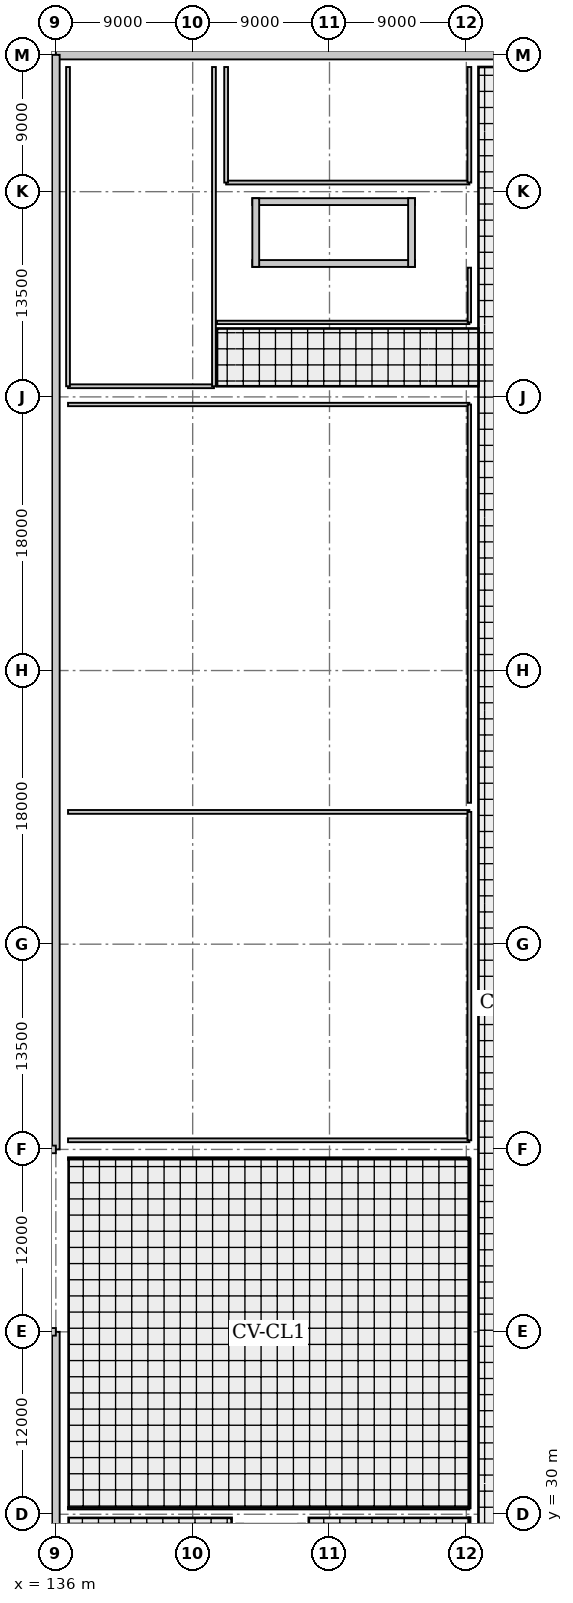
"""IFC4 building model, lengths in metres.
Left out: names, types, materials, properties, quantities, classifications, styles, units other than length and angle.
Written with IfcOpenShell. Run it as: python <this file> out.ifc"""

import sys

from ifc_helpers import new_model, si_unit, direction, frame, frame_2d, origin, origin_2d, place, context, subcontext, project, spatial, rectangle, extrude, element, fill, save


model = new_model("IFC4")
c1 = context("Model", 3, precision=1e-05, world=origin(), true_north=direction((0.0, 1.0)))
c2 = subcontext(c1, "Body", "Model", "MODEL_VIEW")
j1 = project(units=[si_unit("LENGTHUNIT", "METRE"), si_unit("PLANEANGLEUNIT", "RADIAN")], contexts=[c1])
p1 = place(None, origin())
s1 = spatial("IfcSite", under=j1, at=p1, CompositionType="ELEMENT")
p2 = place(p1, origin())
s2 = spatial("IfcBuilding", under=s1, at=p2, CompositionType="ELEMENT")
p3 = place(p2, frame((0.0, 0.0, -5.4)))
s3 = spatial("IfcBuildingStorey", under=s2, at=p3, CompositionType="ELEMENT", Elevation=-5.4)
for number, where, z_axis, x_axis in (
    (1, (136.0, 30.0, 0.0), (0.0, 0.0, 1.0), (1.0, 0.0, 0.0)),
    (2, (136.0, 42.0, 0.0), (0.0, 0.0, 1.0), (1.0, 0.0, 0.0)),
    (3, (136.0, 54.0, 0.0), (0.0, 0.0, 1.0), (1.0, 0.0, 0.0)),
):
    element("IfcColumn", number, at=place(p3, frame(where, z_axis=z_axis, x_axis=x_axis)), inside=s3, PredefinedType="COLUMN", context=c2, shape_type="SweptSolid", body=[
        extrude(rectangle(XDim=0.85, YDim=0.85, at=origin_2d()), origin(), (0.0, 0.0, 1.0), 5.4),
    ])
for number, where, z_axis, x_axis in (
    (4, (136.0, 67.5, 0.0), (0.0, 0.0, 1.0), (1.0, 0.0, 0.0)),
    (5, (136.0, 76.5, 0.0), (0.0, 0.0, 1.0), (1.0, 0.0, 0.0)),
    (6, (136.0, 85.5, 0.0), (0.0, 0.0, 1.0), (1.0, 0.0, 0.0)),
    (7, (136.0, 94.5, 0.0), (0.0, 0.0, 1.0), (1.0, 0.0, 0.0)),
    (8, (136.0, 103.5, 0.0), (0.0, 0.0, 1.0), (1.0, 0.0, 0.0)),
    (9, (136.0, 117.0, 0.0), (0.0, 0.0, 1.0), (1.0, 0.0, 0.0)),
    (10, (136.0, 126.0, 0.0), (0.0, 0.0, 1.0), (1.0, 0.0, 0.0)),
):
    element("IfcColumn", number, at=place(p3, frame(where, z_axis=z_axis, x_axis=x_axis)), inside=s3, PredefinedType="COLUMN", context=c2, shape_type="SweptSolid", body=[
        extrude(rectangle(XDim=1.0, YDim=0.9, at=origin_2d()), origin(), (0.0, 0.0, 1.0), 5.4),
    ])
for number, where, z_axis, x_axis in (
    (11, (145.0, 30.0, 0.0), (0.0, 0.0, 1.0), (1.0, 0.0, 0.0)),
    (12, (145.0, 42.0, 0.0), (0.0, 0.0, 1.0), (1.0, 0.0, 0.0)),
    (13, (145.0, 54.0, 0.0), (0.0, 0.0, 1.0), (1.0, 0.0, 0.0)),
):
    element("IfcColumn", number, at=place(p3, frame(where, z_axis=z_axis, x_axis=x_axis)), inside=s3, PredefinedType="COLUMN", context=c2, shape_type="SweptSolid", body=[
        extrude(rectangle(XDim=0.85, YDim=0.85, at=origin_2d()), origin(), (0.0, 0.0, 1.0), 5.4),
    ])
for number, where, z_axis, x_axis in (
    (14, (145.0, 67.5, 0.0), (0.0, 0.0, 1.0), (1.0, 0.0, 0.0)),
    (15, (145.0, 76.5, 0.0), (0.0, 0.0, 1.0), (1.0, 0.0, 0.0)),
    (16, (145.0, 85.5, 0.0), (0.0, 0.0, 1.0), (1.0, 0.0, 0.0)),
    (17, (145.0, 94.5, 0.0), (0.0, 0.0, 1.0), (1.0, 0.0, 0.0)),
    (18, (145.0, 103.5, 0.0), (0.0, 0.0, 1.0), (1.0, 0.0, 0.0)),
    (19, (145.0, 117.0, 0.0), (0.0, 0.0, 1.0), (1.0, 0.0, 0.0)),
    (20, (145.0, 126.0, 0.0), (0.0, 0.0, 1.0), (1.0, 0.0, 0.0)),
):
    element("IfcColumn", number, at=place(p3, frame(where, z_axis=z_axis, x_axis=x_axis)), inside=s3, PredefinedType="COLUMN", context=c2, shape_type="SweptSolid", body=[
        extrude(rectangle(XDim=1.0, YDim=0.9, at=origin_2d()), origin(), (0.0, 0.0, 1.0), 5.4),
    ])
for number, where, z_axis, x_axis in (
    (21, (154.0, 30.0, 0.0), (0.0, 0.0, 1.0), (1.0, 0.0, 0.0)),
    (22, (154.0, 42.0, 0.0), (0.0, 0.0, 1.0), (1.0, 0.0, 0.0)),
    (23, (154.0, 54.0, 0.0), (0.0, 0.0, 1.0), (1.0, 0.0, 0.0)),
):
    element("IfcColumn", number, at=place(p3, frame(where, z_axis=z_axis, x_axis=x_axis)), inside=s3, PredefinedType="COLUMN", context=c2, shape_type="SweptSolid", body=[
        extrude(rectangle(XDim=0.85, YDim=0.85, at=origin_2d()), origin(), (0.0, 0.0, 1.0), 5.4),
    ])
for number, where, z_axis, x_axis in (
    (24, (154.0, 67.5, 0.0), (0.0, 0.0, 1.0), (1.0, 0.0, 0.0)),
    (25, (154.0, 76.5, 0.0), (0.0, 0.0, 1.0), (1.0, 0.0, 0.0)),
    (26, (154.0, 85.5, 0.0), (0.0, 0.0, 1.0), (1.0, 0.0, 0.0)),
    (27, (154.0, 94.5, 0.0), (0.0, 0.0, 1.0), (1.0, 0.0, 0.0)),
    (28, (154.0, 103.5, 0.0), (0.0, 0.0, 1.0), (1.0, 0.0, 0.0)),
    (29, (154.0, 117.0, 0.0), (0.0, 0.0, 1.0), (1.0, 0.0, 0.0)),
    (30, (154.0, 126.0, 0.0), (0.0, 0.0, 1.0), (1.0, 0.0, 0.0)),
):
    element("IfcColumn", number, at=place(p3, frame(where, z_axis=z_axis, x_axis=x_axis)), inside=s3, PredefinedType="COLUMN", context=c2, shape_type="SweptSolid", body=[
        extrude(rectangle(XDim=1.0, YDim=0.9, at=origin_2d()), origin(), (0.0, 0.0, 1.0), 5.4),
    ])
for number, where, z_axis, x_axis in (
    (31, (163.0, 30.0, 0.0), (0.0, 0.0, 1.0), (1.0, 0.0, 0.0)),
    (32, (163.0, 42.0, 0.0), (0.0, 0.0, 1.0), (1.0, 0.0, 0.0)),
    (33, (163.0, 54.0, 0.0), (0.0, 0.0, 1.0), (1.0, 0.0, 0.0)),
):
    element("IfcColumn", number, at=place(p3, frame(where, z_axis=z_axis, x_axis=x_axis)), inside=s3, PredefinedType="COLUMN", context=c2, shape_type="SweptSolid", body=[
        extrude(rectangle(XDim=0.85, YDim=0.85, at=origin_2d()), origin(), (0.0, 0.0, 1.0), 5.4),
    ])
for number, where, z_axis, x_axis in (
    (34, (163.0, 67.5, 0.0), (0.0, 0.0, 1.0), (1.0, 0.0, 0.0)),
    (35, (163.0, 76.5, 0.0), (0.0, 0.0, 1.0), (1.0, 0.0, 0.0)),
    (36, (163.0, 85.5, 0.0), (0.0, 0.0, 1.0), (1.0, 0.0, 0.0)),
    (37, (163.0, 94.5, 0.0), (0.0, 0.0, 1.0), (1.0, 0.0, 0.0)),
    (38, (163.0, 103.5, 0.0), (0.0, 0.0, 1.0), (1.0, 0.0, 0.0)),
    (39, (163.0, 117.0, 0.0), (0.0, 0.0, 1.0), (1.0, 0.0, 0.0)),
    (40, (163.0, 126.0, 0.0), (0.0, 0.0, 1.0), (1.0, 0.0, 0.0)),
):
    element("IfcColumn", number, at=place(p3, frame(where, z_axis=z_axis, x_axis=x_axis)), inside=s3, PredefinedType="COLUMN", context=c2, shape_type="SweptSolid", body=[
        extrude(rectangle(XDim=1.0, YDim=0.9, at=origin_2d()), origin(), (0.0, 0.0, 1.0), 5.4),
    ])
p4 = place(p3, frame((188.0, 126.0, 0.0), z_axis=(0.0, 0.0, 1.0), x_axis=(-1.0, 0.0, 0.0)))
e41 = element("IfcWall", 41, at=p4, inside=s3, PredefinedType="USERDEFINED", context=c2, shape_type="SweptSolid", body=[
    extrude(rectangle(XDim=52.0, YDim=0.6, at=frame_2d((26.0, 0.0))), origin(), (0.0, 0.0, 1.0), 5.1),
])
p5 = place(p3, frame((136.0, 126.0, 0.0), z_axis=(0.0, 0.0, 1.0), x_axis=(0.0, -1.0, 0.0)))
e42 = element("IfcWall", 42, at=p5, inside=s3, PredefinedType="USERDEFINED", context=c2, shape_type="SweptSolid", body=[
    extrude(rectangle(XDim=72.0, YDim=0.5, at=frame_2d((36.0, 0.0))), origin(), (0.0, 0.0, 1.0), 5.1),
])
p6 = place(p3, frame((136.0, 42.0, 0.0), z_axis=(0.0, 0.0, 1.0), x_axis=(0.0, -1.0, 0.0)))
e43 = element("IfcWall", 43, at=p6, inside=s3, PredefinedType="USERDEFINED", context=c2, shape_type="SweptSolid", body=[
    extrude(rectangle(XDim=42.0, YDim=0.5, at=frame_2d((21.0, 0.0))), origin(), (0.0, 0.0, 1.0), 5.1),
])
for number, where, z_axis, x_axis in (
    (44, (90.0, 54.0, 0.0), (0.0, 0.0, 1.0), (1.0, 0.0, 0.0)),
    (45, (136.0, 42.0, 0.0), (0.0, 0.0, 1.0), (-1.0, 0.0, 0.0)),
):
    element("IfcWall", number, at=place(p3, frame(where, z_axis=z_axis, x_axis=x_axis)), inside=s3, PredefinedType="USERDEFINED", context=c2, shape_type="SweptSolid", body=[
        extrude(rectangle(XDim=46.0, YDim=0.5, at=frame_2d((23.0, 0.0))), origin(), (0.0, 0.0, 1.0), 5.05),
    ])
p7 = place(p3, frame((148.925, 112.275, 0.0), z_axis=(0.0, 0.0, 1.0), x_axis=(1.0, 0.0, 0.0)))
e46 = element("IfcWall", 46, at=p7, inside=s3, PredefinedType="SHEAR", context=c2, shape_type="SweptSolid", body=[
    extrude(rectangle(XDim=10.698, YDim=0.45, at=frame_2d((5.349, 0.0))), origin(), (0.0, 0.0, 1.0), 5.1),
])
p8 = place(p7, frame((0.55, 0.0, 0.0)))
e47 = element("IfcOpeningElement", 47, at=p8, cuts=e46, PredefinedType="OPENING", context=c2, shape_type="SweptSolid", body=[
    extrude(rectangle(XDim=1.3, YDim=2.1, at=frame_2d((0.65, 1.05))), frame((0.0, 0.235, 0.0), z_axis=(0.0, -1.0, 0.0), x_axis=(1.0, 0.0, 0.0)), (0.0, 0.0, 1.0), 0.47),
])
p9 = place(p3, frame((159.623, 116.345, 0.0), z_axis=(0.0, 0.0, 1.0), x_axis=(-1.0, 0.0, 0.0)))
e48 = element("IfcWall", 48, at=p9, inside=s3, PredefinedType="SHEAR", context=c2, shape_type="SweptSolid", body=[
    extrude(rectangle(XDim=10.698, YDim=0.45, at=frame_2d((5.349, 0.0))), origin(), (0.0, 0.0, 1.0), 5.1),
])
for number, where, z_axis, x_axis in (
    (49, (159.397, 112.05, 0.0), (0.0, 0.0, 1.0), (0.0, 1.0, 0.0)),
    (50, (149.15, 116.57, 0.0), (0.0, 0.0, 1.0), (0.0, -1.0, 0.0)),
):
    element("IfcWall", number, at=place(p3, frame(where, z_axis=z_axis, x_axis=x_axis)), inside=s3, PredefinedType="SHEAR", context=c2, shape_type="SweptSolid", body=[
        extrude(rectangle(XDim=4.52, YDim=0.45, at=frame_2d((2.26, 0.0))), origin(), (0.0, 0.0, 1.0), 5.1),
    ])
for number, where, z_axis, x_axis in (
    (51, (163.2, 30.4, 0.0), (0.0, 0.0, 1.0), (-1.0, 0.0, 0.0)),
    (52, (136.8, 53.4, 0.0), (0.0, 0.0, 1.0), (1.0, 0.0, 0.0)),
):
    element("IfcWall", number, at=place(p3, frame(where, z_axis=z_axis, x_axis=x_axis)), inside=s3, PredefinedType="PARTITIONING", context=c2, shape_type="SweptSolid", body=[
        extrude(rectangle(XDim=26.4, YDim=0.16, at=frame_2d((13.2, 0.0))), origin(), (0.0, 0.0, 1.0), 4.4),
    ])
p10 = place(p3, frame((163.2, 53.4, 0.0), z_axis=(0.0, 0.0, 1.0), x_axis=(0.0, -1.0, 0.0)))
e53 = element("IfcWall", 53, at=p10, inside=s3, PredefinedType="PARTITIONING", context=c2, shape_type="SweptSolid", body=[
    extrude(rectangle(XDim=23.0, YDim=0.16, at=frame_2d((11.5, 0.0))), origin(), (0.0, 0.0, 1.0), 4.4),
])
p11 = place(p10, frame((12.9, 0.0, 0.0)))
e54 = element("IfcOpeningElement", 54, at=p11, cuts=e53, PredefinedType="OPENING", context=c2, shape_type="SweptSolid", body=[
    extrude(rectangle(XDim=1.8, YDim=2.2, at=frame_2d((0.9, 1.1))), frame((0.0, 0.09, 0.0), z_axis=(0.0, -1.0, 0.0), x_axis=(1.0, 0.0, 0.0)), (0.0, 0.0, 1.0), 0.18),
])
p12 = place(p10, frame((17.48, 0.0, 0.0)))
e55 = element("IfcOpeningElement", 55, at=p12, cuts=e53, PredefinedType="OPENING", context=c2, shape_type="SweptSolid", body=[
    extrude(rectangle(XDim=1.8, YDim=2.2, at=frame_2d((0.9, 1.1))), frame((0.0, 0.09, 0.0), z_axis=(0.0, -1.0, 0.0), x_axis=(1.0, 0.0, 0.0)), (0.0, 0.0, 1.0), 0.18),
])
p13 = place(p3, frame((163.2, 29.8, 0.0), z_axis=(0.0, 0.0, 1.0), x_axis=(0.0, -1.0, 0.0)))
e56 = element("IfcWall", 56, at=p13, inside=s3, PredefinedType="PARTITIONING", context=c2, shape_type="SweptSolid", body=[
    extrude(rectangle(XDim=13.0, YDim=0.15, at=frame_2d((6.5, 0.0))), origin(), (0.0, 0.0, 1.0), 4.4),
])
p14 = place(p13, frame((5.75, 0.0, 0.0)))
e57 = element("IfcOpeningElement", 57, at=p14, cuts=e56, PredefinedType="OPENING", context=c2, shape_type="SweptSolid", body=[
    extrude(rectangle(XDim=1.5, YDim=2.15, at=frame_2d((0.75, 1.075))), frame((0.0, 0.085, 0.0), z_axis=(0.0, -1.0, 0.0), x_axis=(1.0, 0.0, 0.0)), (0.0, 0.0, 1.0), 0.17),
])
for number, where, z_axis, x_axis in (
    (58, (163.2, 54.6, 0.0), (0.0, 0.0, 1.0), (-1.0, 0.0, 0.0)),
    (59, (136.8, 76.2, 0.0), (0.0, 0.0, 1.0), (1.0, 0.0, 0.0)),
):
    element("IfcWall", number, at=place(p3, frame(where, z_axis=z_axis, x_axis=x_axis)), inside=s3, PredefinedType="SOLIDWALL", context=c2, shape_type="SweptSolid", body=[
        extrude(rectangle(XDim=26.4, YDim=0.25, at=frame_2d((13.2, 0.0))), origin(), (0.0, 0.0, 1.0), 4.4),
    ])
p15 = place(p3, frame((163.2, 76.2, 0.0), z_axis=(0.0, 0.0, 1.0), x_axis=(0.0, -1.0, 0.0)))
e60 = element("IfcWall", 60, at=p15, inside=s3, PredefinedType="SOLIDWALL", context=c2, shape_type="SweptSolid", body=[
    extrude(rectangle(XDim=21.6, YDim=0.25, at=frame_2d((10.8, 0.0))), origin(), (0.0, 0.0, 1.0), 4.4),
])
p16 = place(p15, frame((9.9, 0.0, 0.0)))
e61 = element("IfcOpeningElement", 61, at=p16, cuts=e60, PredefinedType="OPENING", context=c2, shape_type="SweptSolid", body=[
    extrude(rectangle(XDim=1.8, YDim=2.2, at=frame_2d((0.9, 1.1))), frame((0.0, 0.135, 0.0), z_axis=(0.0, -1.0, 0.0), x_axis=(1.0, 0.0, 0.0)), (0.0, 0.0, 1.0), 0.27),
])
p17 = place(p3, frame((136.8, 103.0, 0.0), z_axis=(0.0, 0.0, 1.0), x_axis=(1.0, 0.0, 0.0)))
e62 = element("IfcWall", 62, at=p17, inside=s3, PredefinedType="SOLIDWALL", context=c2, shape_type="SweptSolid", body=[
    extrude(rectangle(XDim=26.4, YDim=0.22, at=frame_2d((13.2, 0.0))), origin(), (0.0, 0.0, 1.0), 4.4),
])
p18 = place(p3, frame((163.2, 103.0, 0.0), z_axis=(0.0, 0.0, 1.0), x_axis=(0.0, -1.0, 0.0)))
e63 = element("IfcWall", 63, at=p18, inside=s3, PredefinedType="SOLIDWALL", context=c2, shape_type="SweptSolid", body=[
    extrude(rectangle(XDim=26.2, YDim=0.22, at=frame_2d((13.1, 0.0))), origin(), (0.0, 0.0, 1.0), 4.4),
])
p19 = place(p18, frame((12.2, 0.0, 0.0)))
e64 = element("IfcOpeningElement", 64, at=p19, cuts=e63, PredefinedType="OPENING", context=c2, shape_type="SweptSolid", body=[
    extrude(rectangle(XDim=1.8, YDim=2.2, at=frame_2d((0.9, 1.1))), frame((0.0, 0.12, 0.0), z_axis=(0.0, -1.0, 0.0), x_axis=(1.0, 0.0, 0.0)), (0.0, 0.0, 1.0), 0.24),
])
p20 = place(p3, frame((146.4, 104.2, 0.0), z_axis=(0.0, 0.0, 1.0), x_axis=(-1.0, 0.0, 0.0)))
e65 = element("IfcWall", 65, at=p20, inside=s3, PredefinedType="SOLIDWALL", context=c2, shape_type="SweptSolid", body=[
    extrude(rectangle(XDim=9.6, YDim=0.25, at=frame_2d((4.8, 0.0))), origin(), (0.0, 0.0, 1.0), 4.4),
])
p21 = place(p3, frame((136.8, 104.2, 0.0), z_axis=(0.0, 0.0, 1.0), x_axis=(0.0, 1.0, 0.0)))
e66 = element("IfcWall", 66, at=p21, inside=s3, PredefinedType="SOLIDWALL", context=c2, shape_type="SweptSolid", body=[
    extrude(rectangle(XDim=21.0, YDim=0.25, at=frame_2d((10.5, 0.0))), origin(), (0.0, 0.0, 1.0), 4.4),
])
p22 = place(p3, frame((146.4, 125.2, 0.0), z_axis=(0.0, 0.0, 1.0), x_axis=(0.0, -1.0, 0.0)))
e67 = element("IfcWall", 67, at=p22, inside=s3, PredefinedType="SOLIDWALL", context=c2, shape_type="SweptSolid", body=[
    extrude(rectangle(XDim=21.0, YDim=0.25, at=frame_2d((10.5, 0.0))), origin(), (0.0, 0.0, 1.0), 4.4),
])
p23 = place(p22, frame((9.75, 0.0, 0.0)))
e68 = element("IfcOpeningElement", 68, at=p23, cuts=e67, PredefinedType="OPENING", context=c2, shape_type="SweptSolid", body=[
    extrude(rectangle(XDim=1.5, YDim=2.15, at=frame_2d((0.75, 1.075))), frame((0.0, 0.135, 0.0), z_axis=(0.0, -1.0, 0.0), x_axis=(1.0, 0.0, 0.0)), (0.0, 0.0, 1.0), 0.27),
])
p24 = place(p3, frame((163.2, 108.4, 0.0), z_axis=(0.0, 0.0, 1.0), x_axis=(-1.0, 0.0, 0.0)))
e69 = element("IfcWall", 69, at=p24, inside=s3, PredefinedType="SOLIDWALL", context=c2, shape_type="SweptSolid", body=[
    extrude(rectangle(XDim=16.6, YDim=0.22, at=frame_2d((8.3, 0.0))), origin(), (0.0, 0.0, 1.0), 4.4),
])
p25 = place(p24, frame((7.65, 0.0, 0.0)))
e70 = element("IfcOpeningElement", 70, at=p25, cuts=e69, PredefinedType="OPENING", context=c2, shape_type="SweptSolid", body=[
    extrude(rectangle(XDim=1.3, YDim=2.1, at=frame_2d((0.65, 1.05))), frame((0.0, 0.12, 0.0), z_axis=(0.0, -1.0, 0.0), x_axis=(1.0, 0.0, 0.0)), (0.0, 0.0, 1.0), 0.24),
])
p26 = place(p3, frame((163.2, 112.0, 0.0), z_axis=(0.0, 0.0, 1.0), x_axis=(0.0, -1.0, 0.0)))
e71 = element("IfcWall", 71, at=p26, inside=s3, PredefinedType="SOLIDWALL", context=c2, shape_type="SweptSolid", body=[
    extrude(rectangle(XDim=3.6, YDim=0.22, at=frame_2d((1.8, 0.0))), origin(), (0.0, 0.0, 1.0), 4.4),
])
p27 = place(p3, frame((163.2, 117.6, 0.0), z_axis=(0.0, 0.0, 1.0), x_axis=(-1.0, 0.0, 0.0)))
e72 = element("IfcWall", 72, at=p27, inside=s3, PredefinedType="SOLIDWALL", context=c2, shape_type="SweptSolid", body=[
    extrude(rectangle(XDim=16.0, YDim=0.25, at=frame_2d((8.0, 0.0))), origin(), (0.0, 0.0, 1.0), 4.4),
])
p28 = place(p3, frame((147.2, 117.6, 0.0), z_axis=(0.0, 0.0, 1.0), x_axis=(0.0, 1.0, 0.0)))
e73 = element("IfcWall", 73, at=p28, inside=s3, PredefinedType="SOLIDWALL", context=c2, shape_type="SweptSolid", body=[
    extrude(rectangle(XDim=7.6, YDim=0.25, at=frame_2d((3.8, 0.0))), origin(), (0.0, 0.0, 1.0), 4.4),
])
p29 = place(p3, frame((163.2, 125.2, 0.0), z_axis=(0.0, 0.0, 1.0), x_axis=(0.0, -1.0, 0.0)))
e74 = element("IfcWall", 74, at=p29, inside=s3, PredefinedType="SOLIDWALL", context=c2, shape_type="SweptSolid", body=[
    extrude(rectangle(XDim=7.6, YDim=0.25, at=frame_2d((3.8, 0.0))), origin(), (0.0, 0.0, 1.0), 4.4),
])
p30 = place(p29, frame((3.15, 0.0, 0.0)))
e75 = element("IfcOpeningElement", 75, at=p30, cuts=e74, PredefinedType="OPENING", context=c2, shape_type="SweptSolid", body=[
    extrude(rectangle(XDim=1.3, YDim=2.1, at=frame_2d((0.65, 1.05))), frame((0.0, 0.135, 0.0), z_axis=(0.0, -1.0, 0.0), x_axis=(1.0, 0.0, 0.0)), (0.0, 0.0, 1.0), 0.27),
])
p31 = place(p8, origin())
e76 = element("IfcDoor", 76, at=p31, inside=s3, OperationType="SINGLE_SWING_LEFT", PredefinedType="DOOR", context=c2, shape_type="SweptSolid", body=[
    extrude(rectangle(XDim=1.3, YDim=2.1, at=frame_2d((0.65, 1.05))), frame((0.0, 0.025, 0.0), z_axis=(0.0, -1.0, 0.0), x_axis=(1.0, 0.0, 0.0)), (0.0, 0.0, 1.0), 0.05),
])
fill(e47, e76)
p32 = place(p11, origin())
e77 = element("IfcDoor", 77, at=p32, inside=s3, OperationType="SINGLE_SWING_RIGHT", PredefinedType="DOOR", context=c2, shape_type="SweptSolid", body=[
    extrude(rectangle(XDim=1.8, YDim=2.2, at=frame_2d((0.9, 1.1))), frame((0.0, 0.025, 0.0), z_axis=(0.0, -1.0, 0.0), x_axis=(1.0, 0.0, 0.0)), (0.0, 0.0, 1.0), 0.05),
])
fill(e54, e77)
p33 = place(p12, origin())
e78 = element("IfcDoor", 78, at=p33, inside=s3, OperationType="SINGLE_SWING_LEFT", PredefinedType="DOOR", context=c2, shape_type="SweptSolid", body=[
    extrude(rectangle(XDim=1.8, YDim=2.2, at=frame_2d((0.9, 1.1))), frame((0.0, 0.025, 0.0), z_axis=(0.0, -1.0, 0.0), x_axis=(1.0, 0.0, 0.0)), (0.0, 0.0, 1.0), 0.05),
])
fill(e55, e78)
p34 = place(p16, origin())
e79 = element("IfcDoor", 79, at=p34, inside=s3, OperationType="SINGLE_SWING_RIGHT", PredefinedType="DOOR", context=c2, shape_type="SweptSolid", body=[
    extrude(rectangle(XDim=1.8, YDim=2.2, at=frame_2d((0.9, 1.1))), frame((0.0, 0.025, 0.0), z_axis=(0.0, -1.0, 0.0), x_axis=(1.0, 0.0, 0.0)), (0.0, 0.0, 1.0), 0.05),
])
fill(e61, e79)
p35 = place(p19, origin())
e80 = element("IfcDoor", 80, at=p35, inside=s3, OperationType="SINGLE_SWING_LEFT", PredefinedType="DOOR", context=c2, shape_type="SweptSolid", body=[
    extrude(rectangle(XDim=1.8, YDim=2.2, at=frame_2d((0.9, 1.1))), frame((0.0, 0.025, 0.0), z_axis=(0.0, -1.0, 0.0), x_axis=(1.0, 0.0, 0.0)), (0.0, 0.0, 1.0), 0.05),
])
fill(e64, e80)
p36 = place(p23, origin())
e81 = element("IfcDoor", 81, at=p36, inside=s3, OperationType="SINGLE_SWING_RIGHT", PredefinedType="DOOR", context=c2, shape_type="SweptSolid", body=[
    extrude(rectangle(XDim=1.5, YDim=2.15, at=frame_2d((0.75, 1.075))), frame((0.0, 0.025, 0.0), z_axis=(0.0, -1.0, 0.0), x_axis=(1.0, 0.0, 0.0)), (0.0, 0.0, 1.0), 0.05),
])
fill(e68, e81)
p37 = place(p25, origin())
e82 = element("IfcDoor", 82, at=p37, inside=s3, OperationType="SINGLE_SWING_LEFT", PredefinedType="DOOR", context=c2, shape_type="SweptSolid", body=[
    extrude(rectangle(XDim=1.3, YDim=2.1, at=frame_2d((0.65, 1.05))), frame((0.0, 0.025, 0.0), z_axis=(0.0, -1.0, 0.0), x_axis=(1.0, 0.0, 0.0)), (0.0, 0.0, 1.0), 0.05),
])
fill(e70, e82)
p38 = place(p30, origin())
e83 = element("IfcDoor", 83, at=p38, inside=s3, OperationType="SINGLE_SWING_RIGHT", PredefinedType="DOOR", context=c2, shape_type="SweptSolid", body=[
    extrude(rectangle(XDim=1.3, YDim=2.1, at=frame_2d((0.65, 1.05))), frame((0.0, 0.025, 0.0), z_axis=(0.0, -1.0, 0.0), x_axis=(1.0, 0.0, 0.0)), (0.0, 0.0, 1.0), 0.05),
])
fill(e75, e83)
save(model, sys.argv[1])
